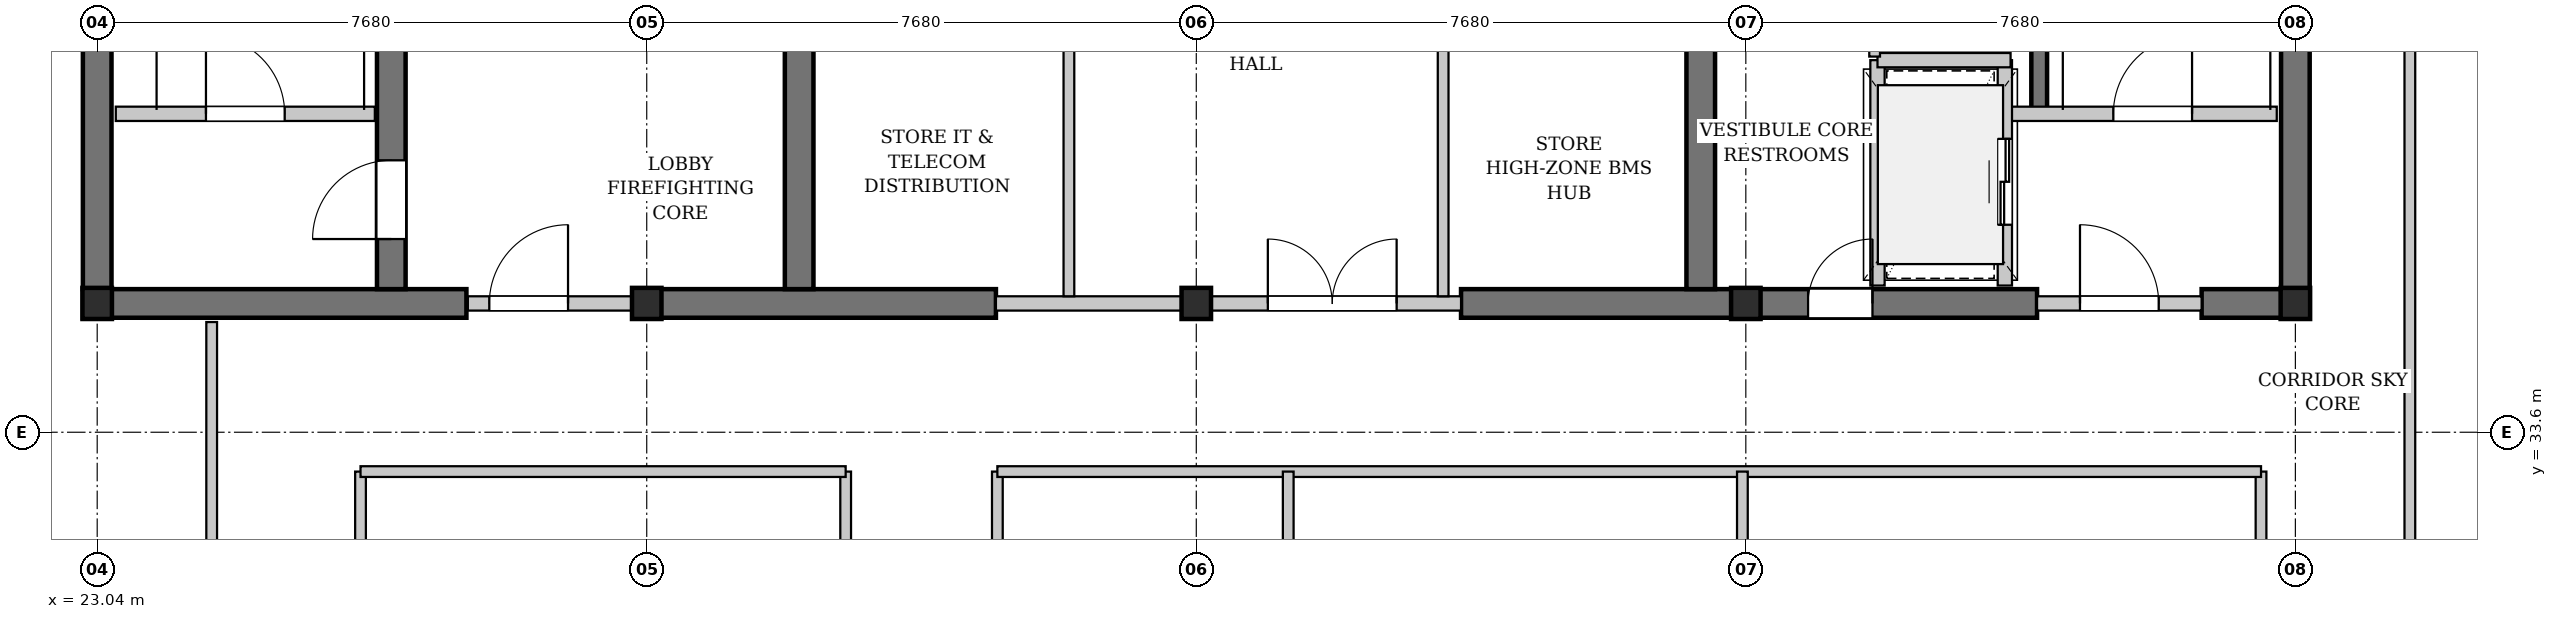
"""IFC4 building model, lengths in metres.
Left out: names, types, materials, properties, quantities, classifications, styles, units other than length and angle.
Written with IfcOpenShell. Run it as: python <this file> out.ifc"""

import sys

from ifc_helpers import new_model, si_unit, direction, frame, frame_2d, origin, origin_2d, place, context, subcontext, project, spatial, rectangle, i_section, extrude, element, fill, save


model = new_model("IFC4")
c1 = context("Model", 3, precision=1e-05, world=origin(), true_north=direction((0.0, 1.0)))
c2 = subcontext(c1, "Body", "Model", "MODEL_VIEW")
j1 = project(units=[si_unit("LENGTHUNIT", "METRE"), si_unit("PLANEANGLEUNIT", "RADIAN")], contexts=[c1])
p1 = place(None, origin())
s1 = spatial("IfcSite", under=j1, at=p1, CompositionType="ELEMENT")
p2 = place(p1, origin())
s2 = spatial("IfcBuilding", under=s1, at=p2, CompositionType="ELEMENT")
p3 = place(p2, frame((0.0, 0.0, 237.5)))
s3 = spatial("IfcBuildingStorey", under=s2, at=p3, CompositionType="ELEMENT", Elevation=237.5)
p4 = place(p3, frame((22.84, 35.4, 0.0), z_axis=(0.0, 0.0, 1.0), x_axis=(1.0, 0.0, 0.0)))
e1 = element("IfcWall", 1, at=p4, inside=s3, PredefinedType="SHEAR", context=c2, shape_type="SweptSolid", body=[
    extrude(rectangle(XDim=5.36, YDim=0.4, at=frame_2d((2.68, 0.0))), origin(), (0.0, 0.0, 1.0), 3.08),
])
p5 = place(p3, frame((30.72, 35.4, 0.0), z_axis=(0.0, 0.0, 1.0), x_axis=(1.0, 0.0, 0.0)))
e2 = element("IfcWall", 2, at=p5, inside=s3, PredefinedType="SHEAR", context=c2, shape_type="SweptSolid", body=[
    extrude(rectangle(XDim=4.88, YDim=0.4, at=frame_2d((2.44, 0.0))), origin(), (0.0, 0.0, 1.0), 3.08),
])
p6 = place(p3, frame((42.1, 35.4, 0.0), z_axis=(0.0, 0.0, 1.0), x_axis=(1.0, 0.0, 0.0)))
e3 = element("IfcWall", 3, at=p6, inside=s3, PredefinedType="SHEAR", context=c2, shape_type="SweptSolid", body=[
    extrude(rectangle(XDim=8.05, YDim=0.4, at=frame_2d((4.025, 0.0))), origin(), (0.0, 0.0, 1.0), 3.08),
])
p7 = place(p6, frame((4.85, 0.0, 0.0)))
e4 = element("IfcOpeningElement", 4, at=p7, cuts=e3, PredefinedType="OPENING", context=c2, shape_type="SweptSolid", body=[
    extrude(rectangle(XDim=0.9, YDim=2.15, at=frame_2d((0.45, 1.075))), frame((0.0, 0.21, 0.0), z_axis=(0.0, -1.0, 0.0), x_axis=(1.0, 0.0, 0.0)), (0.0, 0.0, 1.0), 0.42),
])
p8 = place(p3, frame((52.45, 35.4, 0.0), z_axis=(0.0, 0.0, 1.0), x_axis=(1.0, 0.0, 0.0)))
e5 = element("IfcWall", 5, at=p8, inside=s3, PredefinedType="SHEAR", context=c2, shape_type="SweptSolid", body=[
    extrude(rectangle(XDim=1.51, YDim=0.4, at=frame_2d((0.755, 0.0))), origin(), (0.0, 0.0, 1.0), 3.08),
])
p9 = place(p3, frame((23.04, 35.6, 0.0), z_axis=(0.0, 0.0, 1.0), x_axis=(0.0, 1.0, 0.0)))
e6 = element("IfcWall", 6, at=p9, inside=s3, PredefinedType="SHEAR", context=c2, shape_type="SweptSolid", body=[
    extrude(rectangle(XDim=10.4, YDim=0.4, at=frame_2d((5.2, 0.0))), origin(), (0.0, 0.0, 1.0), 3.08),
])
p10 = place(p3, frame((27.15, 35.6, 0.0), z_axis=(0.0, 0.0, 1.0), x_axis=(0.0, 1.0, 0.0)))
e7 = element("IfcWall", 7, at=p10, inside=s3, PredefinedType="SHEAR", context=c2, shape_type="SweptSolid", body=[
    extrude(rectangle(XDim=10.4, YDim=0.4, at=frame_2d((5.2, 0.0))), origin(), (0.0, 0.0, 1.0), 3.08),
])
p11 = place(p10, frame((0.7, 0.0, 0.0)))
e8 = element("IfcOpeningElement", 8, at=p11, cuts=e7, PredefinedType="OPENING", context=c2, shape_type="SweptSolid", body=[
    extrude(rectangle(XDim=1.1, YDim=2.15, at=frame_2d((0.55, 1.075))), frame((0.0, 0.21, 0.0), z_axis=(0.0, -1.0, 0.0), x_axis=(1.0, 0.0, 0.0)), (0.0, 0.0, 1.0), 0.42),
])
for number, where, z_axis, x_axis in (
    (9, (32.85, 35.6, 0.0), (0.0, 0.0, 1.0), (0.0, 1.0, 0.0)),
    (10, (45.45, 35.6, 0.0), (0.0, 0.0, 1.0), (0.0, 1.0, 0.0)),
    (11, (53.76, 35.6, 0.0), (0.0, 0.0, 1.0), (0.0, 1.0, 0.0)),
):
    element("IfcWall", number, at=place(p3, frame(where, z_axis=z_axis, x_axis=x_axis)), inside=s3, PredefinedType="SHEAR", context=c2, shape_type="SweptSolid", body=[
        extrude(rectangle(XDim=10.4, YDim=0.4, at=frame_2d((5.2, 0.0))), origin(), (0.0, 0.0, 1.0), 3.08),
    ])
p12 = place(p3, frame((50.18, 38.05, 0.0), z_axis=(0.0, 0.0, 1.0), x_axis=(0.0, 1.0, 0.0)))
e12 = element("IfcWall", 12, at=p12, inside=s3, PredefinedType="SHEAR", context=c2, shape_type="SweptSolid", body=[
    extrude(rectangle(XDim=7.95, YDim=0.22, at=frame_2d((3.975, 0.0))), origin(), (0.0, 0.0, 1.0), 3.08),
])
for number, where, z_axis, x_axis in (
    (13, (23.04, 35.4, 0.0), (0.0, 0.0, 1.0), (1.0, 0.0, 0.0)),
    (14, (30.72, 35.4, 0.0), (0.0, 0.0, 1.0), (1.0, 0.0, 0.0)),
    (15, (38.4, 35.4, 0.0), (0.0, 0.0, 1.0), (1.0, 0.0, 0.0)),
    (16, (46.08, 35.4, 0.0), (0.0, 0.0, 1.0), (1.0, 0.0, 0.0)),
    (17, (53.76, 35.4, 0.0), (0.0, 0.0, 1.0), (1.0, 0.0, 0.0)),
):
    element("IfcColumn", number, at=place(p3, frame(where, z_axis=z_axis, x_axis=x_axis)), inside=s3, PredefinedType="COLUMN", context=c2, shape_type="SweptSolid", body=[
        extrude(i_section(OverallWidth=0.412, OverallDepth=0.435, WebThickness=0.036, FlangeThickness=0.058, FilletRadius=0.015, at=origin_2d()), origin(), (0.0, 0.0, 1.0), 3.3),
    ])
p13 = place(p3, frame((23.3, 38.05, 0.0), z_axis=(0.0, 0.0, 1.0), x_axis=(1.0, 0.0, 0.0)))
e18 = element("IfcWall", 18, at=p13, inside=s3, PredefinedType="PARTITIONING", context=c2, shape_type="SweptSolid", body=[
    extrude(rectangle(XDim=3.62, YDim=0.2, at=frame_2d((1.81, 0.0))), origin(), (0.0, 0.0, 1.0), 3.08),
])
p14 = place(p13, frame((1.26, 0.0, 0.0)))
e19 = element("IfcOpeningElement", 19, at=p14, cuts=e18, PredefinedType="OPENING", context=c2, shape_type="SweptSolid", body=[
    extrude(rectangle(XDim=1.1, YDim=2.15, at=frame_2d((0.55, 1.075))), frame((0.0, 0.11, 0.0), z_axis=(0.0, -1.0, 0.0), x_axis=(1.0, 0.0, 0.0)), (0.0, 0.0, 1.0), 0.22),
])
p15 = place(p3, frame((28.22, 35.4, 0.0), z_axis=(0.0, 0.0, 1.0), x_axis=(1.0, 0.0, 0.0)))
e20 = element("IfcWall", 20, at=p15, inside=s3, PredefinedType="PARTITIONING", context=c2, shape_type="SweptSolid", body=[
    extrude(rectangle(XDim=2.5, YDim=0.2, at=frame_2d((1.25, 0.0))), origin(), (0.0, 0.0, 1.0), 2.313),
])
p16 = place(p15, frame((0.3, 0.0, 0.0)))
e21 = element("IfcOpeningElement", 21, at=p16, cuts=e20, PredefinedType="OPENING", context=c2, shape_type="SweptSolid", body=[
    extrude(rectangle(XDim=1.1, YDim=2.15, at=frame_2d((0.55, 1.075))), frame((0.0, 0.11, 0.0), z_axis=(0.0, -1.0, 0.0), x_axis=(1.0, 0.0, 0.0)), (0.0, 0.0, 1.0), 0.22),
])
p17 = place(p3, frame((35.6, 35.4, 0.0), z_axis=(0.0, 0.0, 1.0), x_axis=(1.0, 0.0, 0.0)))
e22 = element("IfcWall", 22, at=p17, inside=s3, PredefinedType="PARTITIONING", context=c2, shape_type="SweptSolid", body=[
    extrude(rectangle(XDim=6.5, YDim=0.2, at=frame_2d((3.25, 0.0))), origin(), (0.0, 0.0, 1.0), 2.313),
])
p18 = place(p17, frame((3.8, 0.0, 0.0)))
e23 = element("IfcOpeningElement", 23, at=p18, cuts=e22, PredefinedType="OPENING", context=c2, shape_type="SweptSolid", body=[
    extrude(rectangle(XDim=1.8, YDim=2.3, at=frame_2d((0.9, 1.15))), frame((0.0, 0.11, 0.0), z_axis=(0.0, -1.0, 0.0), x_axis=(1.0, 0.0, 0.0)), (0.0, 0.0, 1.0), 0.22),
])
p19 = place(p3, frame((36.62, 35.5, 0.0), z_axis=(0.0, 0.0, 1.0), x_axis=(0.0, 1.0, 0.0)))
e24 = element("IfcWall", 24, at=p19, inside=s3, PredefinedType="PARTITIONING", context=c2, shape_type="SweptSolid", body=[
    extrude(rectangle(XDim=10.42, YDim=0.15, at=frame_2d((5.21, 0.0))), origin(), (0.0, 0.0, 1.0), 3.08),
])
p20 = place(p19, frame((3.92, 0.0, 0.0)))
e25 = element("IfcOpeningElement", 25, at=p20, cuts=e24, PredefinedType="OPENING", context=c2, shape_type="SweptSolid", body=[
    extrude(rectangle(XDim=0.9, YDim=2.15, at=frame_2d((0.45, 1.075))), frame((0.0, 0.085, 0.0), z_axis=(0.0, -1.0, 0.0), x_axis=(1.0, 0.0, 0.0)), (0.0, 0.0, 1.0), 0.17),
])
p21 = place(p19, frame((5.85, 0.0, 0.0)))
e26 = element("IfcOpeningElement", 26, at=p21, cuts=e24, PredefinedType="OPENING", context=c2, shape_type="SweptSolid", body=[
    extrude(rectangle(XDim=0.9, YDim=2.15, at=frame_2d((0.45, 1.075))), frame((0.0, 0.085, 0.0), z_axis=(0.0, -1.0, 0.0), x_axis=(1.0, 0.0, 0.0)), (0.0, 0.0, 1.0), 0.17),
])
p22 = place(p3, frame((41.85, 35.5, 0.0), z_axis=(0.0, 0.0, 1.0), x_axis=(0.0, 1.0, 0.0)))
e27 = element("IfcWall", 27, at=p22, inside=s3, PredefinedType="PARTITIONING", context=c2, shape_type="SweptSolid", body=[
    extrude(rectangle(XDim=10.42, YDim=0.15, at=frame_2d((5.21, 0.0))), origin(), (0.0, 0.0, 1.0), 3.08),
])
p23 = place(p22, frame((3.92, 0.0, 0.0)))
e28 = element("IfcOpeningElement", 28, at=p23, cuts=e27, PredefinedType="OPENING", context=c2, shape_type="SweptSolid", body=[
    extrude(rectangle(XDim=0.9, YDim=2.15, at=frame_2d((0.45, 1.075))), frame((0.0, 0.085, 0.0), z_axis=(0.0, -1.0, 0.0), x_axis=(1.0, 0.0, 0.0)), (0.0, 0.0, 1.0), 0.17),
])
p24 = place(p22, frame((5.85, 0.0, 0.0)))
e29 = element("IfcOpeningElement", 29, at=p24, cuts=e27, PredefinedType="OPENING", context=c2, shape_type="SweptSolid", body=[
    extrude(rectangle(XDim=0.9, YDim=2.15, at=frame_2d((0.45, 1.075))), frame((0.0, 0.085, 0.0), z_axis=(0.0, -1.0, 0.0), x_axis=(1.0, 0.0, 0.0)), (0.0, 0.0, 1.0), 0.17),
])
p25 = place(p3, frame((49.78, 38.05, 0.0), z_axis=(0.0, 0.0, 1.0), x_axis=(1.0, 0.0, 0.0)))
e30 = element("IfcWall", 30, at=p25, inside=s3, PredefinedType="PARTITIONING", context=c2, shape_type="SweptSolid", body=[
    extrude(rectangle(XDim=3.72, YDim=0.2, at=frame_2d((1.86, 0.0))), origin(), (0.0, 0.0, 1.0), 3.08),
])
p26 = place(p25, frame((1.436, 0.0, 0.0)))
e31 = element("IfcOpeningElement", 31, at=p26, cuts=e30, PredefinedType="OPENING", context=c2, shape_type="SweptSolid", body=[
    extrude(rectangle(XDim=1.1, YDim=2.15, at=frame_2d((0.55, 1.075))), frame((0.0, 0.11, 0.0), z_axis=(0.0, -1.0, 0.0), x_axis=(1.0, 0.0, 0.0)), (0.0, 0.0, 1.0), 0.22),
])
p27 = place(p3, frame((50.15, 35.4, 0.0), z_axis=(0.0, 0.0, 1.0), x_axis=(1.0, 0.0, 0.0)))
e32 = element("IfcWall", 32, at=p27, inside=s3, PredefinedType="PARTITIONING", context=c2, shape_type="SweptSolid", body=[
    extrude(rectangle(XDim=2.3, YDim=0.2, at=frame_2d((1.15, 0.0))), origin(), (0.0, 0.0, 1.0), 2.313),
])
p28 = place(p27, frame((0.6, 0.0, 0.0)))
e33 = element("IfcOpeningElement", 33, at=p28, cuts=e32, PredefinedType="OPENING", context=c2, shape_type="SweptSolid", body=[
    extrude(rectangle(XDim=1.1, YDim=2.15, at=frame_2d((0.55, 1.075))), frame((0.0, 0.11, 0.0), z_axis=(0.0, -1.0, 0.0), x_axis=(1.0, 0.0, 0.0)), (0.0, 0.0, 1.0), 0.22),
])
p29 = place(p3, frame((49.7, 35.65, 0.0), z_axis=(0.0, 0.0, 1.0), x_axis=(0.0, 1.0, 0.0)))
e34 = element("IfcWall", 34, at=p29, inside=s3, PredefinedType="PARTITIONING", context=c2, shape_type="SweptSolid", body=[
    extrude(rectangle(XDim=3.15, YDim=0.2, at=frame_2d((1.575, 0.0))), origin(), (0.0, 0.0, 1.0), 3.08),
])
p30 = place(p29, frame((0.85, 0.0, 0.0)))
e35 = element("IfcOpeningElement", 35, at=p30, cuts=e34, PredefinedType="OPENING", context=c2, shape_type="SweptSolid", body=[
    extrude(rectangle(XDim=1.2, YDim=2.2, at=frame_2d((0.6, 1.1))), frame((0.0, 0.11, 0.0), z_axis=(0.0, -1.0, 0.0), x_axis=(1.0, 0.0, 0.0)), (0.0, 0.0, 1.0), 0.22),
])
p31 = place(p3, frame((47.92, 35.65, 0.0), z_axis=(0.0, 0.0, 1.0), x_axis=(0.0, 1.0, 0.0)))
e36 = element("IfcWall", 36, at=p31, inside=s3, PredefinedType="PARTITIONING", context=c2, shape_type="SweptSolid", body=[
    extrude(rectangle(XDim=3.15, YDim=0.2, at=frame_2d((1.575, 0.0))), origin(), (0.0, 0.0, 1.0), 3.08),
])
p32 = place(p3, frame((47.92, 38.8, 0.0), z_axis=(0.0, 0.0, 1.0), x_axis=(1.0, 0.0, 0.0)))
e37 = element("IfcWall", 37, at=p32, inside=s3, PredefinedType="PARTITIONING", context=c2, shape_type="SweptSolid", body=[
    extrude(rectangle(XDim=1.86, YDim=0.2, at=frame_2d((0.93, 0.0))), origin(), (0.0, 0.0, 1.0), 3.08),
])
p33 = place(p3, frame((47.88, 38.85, 0.0), z_axis=(0.0, 0.0, 1.0), x_axis=(0.0, 1.0, 0.0)))
e38 = element("IfcWall", 38, at=p33, inside=s3, PredefinedType="PARTITIONING", context=c2, shape_type="SweptSolid", body=[
    extrude(rectangle(XDim=4.87, YDim=0.15, at=frame_2d((2.435, 0.0))), origin(), (0.0, 0.0, 1.0), 3.08),
])
p34 = place(p33, frame((0.7, 0.0, 0.0)))
e39 = element("IfcOpeningElement", 39, at=p34, cuts=e38, PredefinedType="OPENING", context=c2, shape_type="SweptSolid", body=[
    extrude(rectangle(XDim=0.9, YDim=2.15, at=frame_2d((0.45, 1.075))), frame((0.0, 0.085, 0.0), z_axis=(0.0, -1.0, 0.0), x_axis=(1.0, 0.0, 0.0)), (0.0, 0.0, 1.0), 0.17),
])
p35 = place(p33, frame((3.15, 0.0, 0.0)))
e40 = element("IfcOpeningElement", 40, at=p35, cuts=e38, PredefinedType="OPENING", context=c2, shape_type="SweptSolid", body=[
    extrude(rectangle(XDim=0.9, YDim=2.15, at=frame_2d((0.45, 1.075))), frame((0.0, 0.085, 0.0), z_axis=(0.0, -1.0, 0.0), x_axis=(1.0, 0.0, 0.0)), (0.0, 0.0, 1.0), 0.17),
])
p36 = place(p3, frame((24.64, 25.05, 0.0), z_axis=(0.0, 0.0, 1.0), x_axis=(0.0, 1.0, 0.0)))
e41 = element("IfcWall", 41, at=p36, inside=s3, PredefinedType="PARTITIONING", context=c2, shape_type="SweptSolid", body=[
    extrude(rectangle(XDim=10.09, YDim=0.15, at=frame_2d((5.045, 0.0))), origin(), (0.0, 0.0, 1.0), 3.08),
])
p37 = place(p36, frame((1.03, 0.0, 0.0)))
e42 = element("IfcOpeningElement", 42, at=p37, cuts=e41, PredefinedType="OPENING", context=c2, shape_type="SweptSolid", body=[
    extrude(rectangle(XDim=0.9, YDim=2.15, at=frame_2d((0.45, 1.075))), frame((0.0, 0.085, 0.0), z_axis=(0.0, -1.0, 0.0), x_axis=(1.0, 0.0, 0.0)), (0.0, 0.0, 1.0), 0.17),
])
p38 = place(p3, frame((55.36, 25.05, 0.0), z_axis=(0.0, 0.0, 1.0), x_axis=(0.0, 1.0, 0.0)))
e43 = element("IfcWall", 43, at=p38, inside=s3, PredefinedType="PARTITIONING", context=c2, shape_type="SweptSolid", body=[
    extrude(rectangle(XDim=24.863, YDim=0.15, at=frame_2d((12.431, 0.0))), origin(), (0.0, 0.0, 1.0), 3.08),
])
p39 = place(p38, frame((1.03, 0.0, 0.0)))
e44 = element("IfcOpeningElement", 44, at=p39, cuts=e43, PredefinedType="OPENING", context=c2, shape_type="SweptSolid", body=[
    extrude(rectangle(XDim=0.9, YDim=2.15, at=frame_2d((0.45, 1.075))), frame((0.0, 0.085, 0.0), z_axis=(0.0, -1.0, 0.0), x_axis=(1.0, 0.0, 0.0)), (0.0, 0.0, 1.0), 0.17),
])
for number, where, z_axis, x_axis in (
    (45, (26.72, 27.13, 0.0), (0.0, 0.0, 1.0), (0.0, 1.0, 0.0)),
    (46, (53.28, 27.13, 0.0), (0.0, 0.0, 1.0), (0.0, 1.0, 0.0)),
    (47, (33.5, 27.13, 0.0), (0.0, 0.0, 1.0), (0.0, 1.0, 0.0)),
    (48, (35.62, 27.13, 0.0), (0.0, 0.0, 1.0), (0.0, 1.0, 0.0)),
):
    element("IfcWall", number, at=place(p3, frame(where, z_axis=z_axis, x_axis=x_axis)), inside=s3, PredefinedType="PARTITIONING", context=c2, shape_type="SweptSolid", body=[
        extrude(rectangle(XDim=5.92, YDim=0.15, at=frame_2d((2.96, 0.0))), origin(), (0.0, 0.0, 1.0), 3.08),
    ])
p40 = place(p3, frame((26.72, 33.05, 0.0), z_axis=(0.0, 0.0, 1.0), x_axis=(1.0, 0.0, 0.0)))
e49 = element("IfcWall", 49, at=p40, inside=s3, PredefinedType="PARTITIONING", context=c2, shape_type="SweptSolid", body=[
    extrude(rectangle(XDim=6.78, YDim=0.15, at=frame_2d((3.39, 0.0))), origin(), (0.0, 0.0, 1.0), 3.08),
])
p41 = place(p3, frame((35.62, 33.05, 0.0), z_axis=(0.0, 0.0, 1.0), x_axis=(1.0, 0.0, 0.0)))
e50 = element("IfcWall", 50, at=p41, inside=s3, PredefinedType="PARTITIONING", context=c2, shape_type="SweptSolid", body=[
    extrude(rectangle(XDim=17.66, YDim=0.15, at=frame_2d((8.83, 0.0))), origin(), (0.0, 0.0, 1.0), 3.08),
])
p42 = place(p3, frame((39.685, 27.13, 0.0), z_axis=(0.0, 0.0, 1.0), x_axis=(0.0, 1.0, 0.0)))
e51 = element("IfcWall", 51, at=p42, inside=s3, PredefinedType="PARTITIONING", context=c2, shape_type="SweptSolid", body=[
    extrude(rectangle(XDim=5.92, YDim=0.15, at=frame_2d((2.96, 0.0))), origin(), (0.0, 0.0, 1.0), 3.08),
])
p43 = place(p3, frame((46.032, 27.13, 0.0), z_axis=(0.0, 0.0, 1.0), x_axis=(0.0, 1.0, 0.0)))
e52 = element("IfcWall", 52, at=p43, inside=s3, PredefinedType="PARTITIONING", context=c2, shape_type="SweptSolid", body=[
    extrude(rectangle(XDim=5.92, YDim=0.15, at=frame_2d((2.96, 0.0))), origin(), (0.0, 0.0, 1.0), 2.313),
])
p44 = place(p14, origin())
e53 = element("IfcDoor", 53, at=p44, inside=s3, OperationType="SINGLE_SWING_LEFT", PredefinedType="DOOR", context=c2, shape_type="SweptSolid", body=[
    extrude(rectangle(XDim=1.1, YDim=2.15, at=frame_2d((0.55, 1.075))), frame((0.0, 0.025, 0.0), z_axis=(0.0, -1.0, 0.0), x_axis=(1.0, 0.0, 0.0)), (0.0, 0.0, 1.0), 0.05),
])
fill(e19, e53)
p45 = place(p16, origin())
e54 = element("IfcDoor", 54, at=p45, inside=s3, OperationType="SINGLE_SWING_RIGHT", PredefinedType="DOOR", context=c2, shape_type="SweptSolid", body=[
    extrude(rectangle(XDim=1.1, YDim=2.15, at=frame_2d((0.55, 1.075))), frame((0.0, 0.025, 0.0), z_axis=(0.0, -1.0, 0.0), x_axis=(1.0, 0.0, 0.0)), (0.0, 0.0, 1.0), 0.05),
])
fill(e21, e54)
p46 = place(p18, origin())
e55 = element("IfcDoor", 55, at=p46, inside=s3, OperationType="DOUBLE_DOOR_SINGLE_SWING", PredefinedType="DOOR", context=c2, shape_type="SweptSolid", body=[
    extrude(rectangle(XDim=1.8, YDim=2.3, at=frame_2d((0.9, 1.15))), frame((0.0, 0.025, 0.0), z_axis=(0.0, -1.0, 0.0), x_axis=(1.0, 0.0, 0.0)), (0.0, 0.0, 1.0), 0.05),
])
fill(e23, e55)
p47 = place(p26, origin())
e56 = element("IfcDoor", 56, at=p47, inside=s3, OperationType="SINGLE_SWING_RIGHT", PredefinedType="DOOR", context=c2, shape_type="SweptSolid", body=[
    extrude(rectangle(XDim=1.1, YDim=2.15, at=frame_2d((0.55, 1.075))), frame((0.0, 0.025, 0.0), z_axis=(0.0, -1.0, 0.0), x_axis=(1.0, 0.0, 0.0)), (0.0, 0.0, 1.0), 0.05),
])
fill(e31, e56)
p48 = place(p28, origin())
e57 = element("IfcDoor", 57, at=p48, inside=s3, OperationType="SINGLE_SWING_LEFT", PredefinedType="DOOR", context=c2, shape_type="SweptSolid", body=[
    extrude(rectangle(XDim=1.1, YDim=2.15, at=frame_2d((0.55, 1.075))), frame((0.0, 0.025, 0.0), z_axis=(0.0, -1.0, 0.0), x_axis=(1.0, 0.0, 0.0)), (0.0, 0.0, 1.0), 0.05),
])
fill(e33, e57)
p49 = place(p30, origin())
e58 = element("IfcDoor", 58, at=p49, inside=s3, OperationType="DOUBLE_DOOR_SLIDING", PredefinedType="DOOR", context=c2, shape_type="SweptSolid", body=[
    extrude(rectangle(XDim=1.2, YDim=2.2, at=frame_2d((0.6, 1.1))), frame((0.0, 0.025, 0.0), z_axis=(0.0, -1.0, 0.0), x_axis=(1.0, 0.0, 0.0)), (0.0, 0.0, 1.0), 0.05),
])
fill(e35, e58)
p50 = place(p11, origin())
e59 = element("IfcDoor", 59, at=p50, inside=s3, OperationType="SINGLE_SWING_LEFT", PredefinedType="DOOR", context=c2, shape_type="SweptSolid", body=[
    extrude(rectangle(XDim=1.1, YDim=2.15, at=frame_2d((0.55, 1.075))), frame((0.0, 0.025, 0.0), z_axis=(0.0, -1.0, 0.0), x_axis=(1.0, 0.0, 0.0)), (0.0, 0.0, 1.0), 0.05),
])
fill(e8, e59)
p51 = place(p7, origin())
e60 = element("IfcDoor", 60, at=p51, inside=s3, OperationType="SINGLE_SWING_RIGHT", PredefinedType="DOOR", context=c2, shape_type="SweptSolid", body=[
    extrude(rectangle(XDim=0.9, YDim=2.15, at=frame_2d((0.45, 1.075))), frame((0.0, 0.025, 0.0), z_axis=(0.0, -1.0, 0.0), x_axis=(1.0, 0.0, 0.0)), (0.0, 0.0, 1.0), 0.05),
])
fill(e4, e60)
save(model, sys.argv[1])
